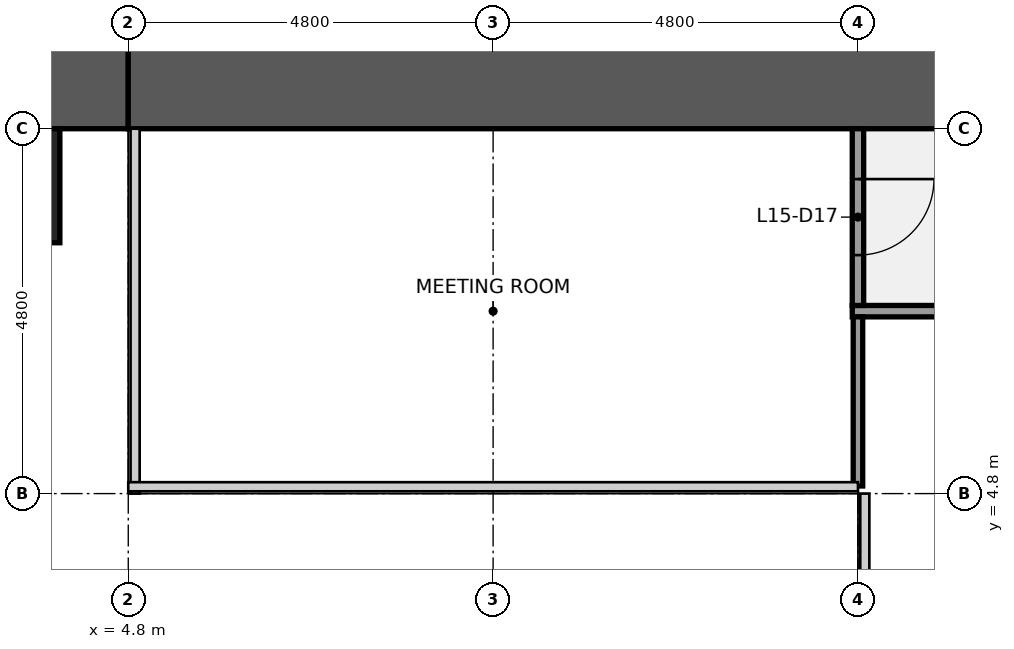
"""IFC4 building model, lengths in metres.
Left out: names, types, materials, properties, quantities, classifications, styles, units other than length and angle.
Written with IfcOpenShell. Run it as: python <this file> out.ifc"""

import sys

from ifc_helpers import new_model, si_unit, direction, frame, frame_2d, origin, origin_2d, place, context, subcontext, project, spatial, rectangle, extrude, element, fill, save


model = new_model("IFC4")
c1 = context("Model", 3, precision=1e-05, world=origin(), true_north=direction((0.0, 1.0)))
c2 = subcontext(c1, "Body", "Model", "MODEL_VIEW")
j1 = project(units=[si_unit("LENGTHUNIT", "METRE"), si_unit("PLANEANGLEUNIT", "RADIAN")], contexts=[c1])
p1 = place(None, origin())
s1 = spatial("IfcSite", under=j1, at=p1, CompositionType="ELEMENT")
p2 = place(p1, origin())
s2 = spatial("IfcBuilding", under=s1, at=p2, CompositionType="ELEMENT")
p3 = place(p2, frame((0.0, 0.0, 71.0)))
s3 = spatial("IfcBuildingStorey", under=s2, at=p3, CompositionType="ELEMENT", Elevation=71.0)
p4 = place(p3, frame((4.8, 10.2, 0.0), z_axis=(0.0, 0.0, 1.0), x_axis=(-1.0, 0.0, 0.0)))
e1 = element("IfcWall", 1, at=p4, inside=s3, PredefinedType="SHEAR", context=c2, shape_type="SweptSolid", body=[
    extrude(rectangle(XDim=3.6, YDim=1.2, at=frame_2d((1.8, 0.0))), origin(), (0.0, 0.0, 1.0), 3.84),
])
p5 = place(p3, frame((18.0, 10.2, 0.0), z_axis=(0.0, 0.0, 1.0), x_axis=(-1.0, 0.0, 0.0)))
e2 = element("IfcWall", 2, at=p5, inside=s3, PredefinedType="SHEAR", context=c2, shape_type="SweptSolid", body=[
    extrude(rectangle(XDim=13.2, YDim=1.2, at=frame_2d((6.6, 0.0))), origin(), (0.0, 0.0, 1.0), 3.84),
])
p6 = place(p5, frame((0.65, 0.0, 0.0)))
e3 = element("IfcOpeningElement", 3, at=p6, cuts=e2, PredefinedType="OPENING", context=c2, shape_type="SweptSolid", body=[
    extrude(rectangle(XDim=1.1, YDim=2.1, at=frame_2d((0.55, 1.05))), frame((0.0, 0.61, 0.0), z_axis=(0.0, -1.0, 0.0), x_axis=(1.0, 0.0, 0.0)), (0.0, 0.0, 1.0), 1.22),
])
p7 = place(p3, frame((14.325, 7.2, 0.0), z_axis=(0.0, 0.0, 1.0), x_axis=(1.0, 0.0, 0.0)))
e4 = element("IfcWall", 4, at=p7, inside=s3, PredefinedType="PARTITIONING", context=c2, shape_type="SweptSolid", body=[
    extrude(rectangle(XDim=4.95, YDim=0.15, at=frame_2d((2.475, 0.0))), origin(), (0.0, 0.0, 1.0), 2.87),
])
p8 = place(p7, frame((1.975, 0.0, 0.0)))
e5 = element("IfcOpeningElement", 5, at=p8, cuts=e4, PredefinedType="OPENING", context=c2, shape_type="SweptSolid", body=[
    extrude(rectangle(XDim=1.0, YDim=2.1, at=frame_2d((0.5, 1.05))), frame((0.0, 0.085, 0.0), z_axis=(0.0, -1.0, 0.0), x_axis=(1.0, 0.0, 0.0)), (0.0, 0.0, 1.0), 0.17),
])
p9 = place(p3, frame((14.4, 4.9, 0.0), z_axis=(0.0, 0.0, 1.0), x_axis=(0.0, 1.0, 0.0)))
e6 = element("IfcWall", 6, at=p9, inside=s3, PredefinedType="PARTITIONING", context=c2, shape_type="SweptSolid", body=[
    extrude(rectangle(XDim=2.225, YDim=0.125, at=frame_2d((1.113, 0.0))), origin(), (0.0, 0.0, 1.0), 2.87),
])
p10 = place(p3, frame((14.4, 7.275, 0.0), z_axis=(0.0, 0.0, 1.0), x_axis=(0.0, 1.0, 0.0)))
e7 = element("IfcWall", 7, at=p10, inside=s3, PredefinedType="PARTITIONING", context=c2, shape_type="SweptSolid", body=[
    extrude(rectangle(XDim=2.325, YDim=0.15, at=frame_2d((1.163, 0.0))), origin(), (0.0, 0.0, 1.0), 2.87),
])
p11 = place(p10, frame((0.663, 0.0, 0.0)))
e8 = element("IfcOpeningElement", 8, at=p11, cuts=e7, PredefinedType="OPENING", context=c2, shape_type="SweptSolid", body=[
    extrude(rectangle(XDim=1.0, YDim=2.1, at=frame_2d((0.5, 1.05))), frame((0.0, 0.085, 0.0), z_axis=(0.0, -1.0, 0.0), x_axis=(1.0, 0.0, 0.0)), (0.0, 0.0, 1.0), 0.17),
])
p12 = place(p3, frame((2.4, 8.85, 0.0), z_axis=(0.0, 0.0, 1.0), x_axis=(1.0, 0.0, 0.0)))
e9 = element("IfcColumn", 9, at=p12, inside=s3, PredefinedType="PILASTER", context=c2, shape_type="SweptSolid", body=[
    extrude(rectangle(XDim=3.0, YDim=1.5, at=origin_2d()), origin(), (0.0, 0.0, 1.0), 4.0),
])
p13 = place(p11, origin())
e10 = element("IfcDoor", 10, at=p13, inside=s3, OperationType="SINGLE_SWING_RIGHT", PredefinedType="DOOR", context=c2, shape_type="SweptSolid", body=[
    extrude(rectangle(XDim=1.0, YDim=2.1, at=frame_2d((0.5, 1.05))), frame((0.0, 0.025, 0.0), z_axis=(0.0, -1.0, 0.0), x_axis=(1.0, 0.0, 0.0)), (0.0, 0.0, 1.0), 0.05),
])
fill(e8, e10)
save(model, sys.argv[1])
